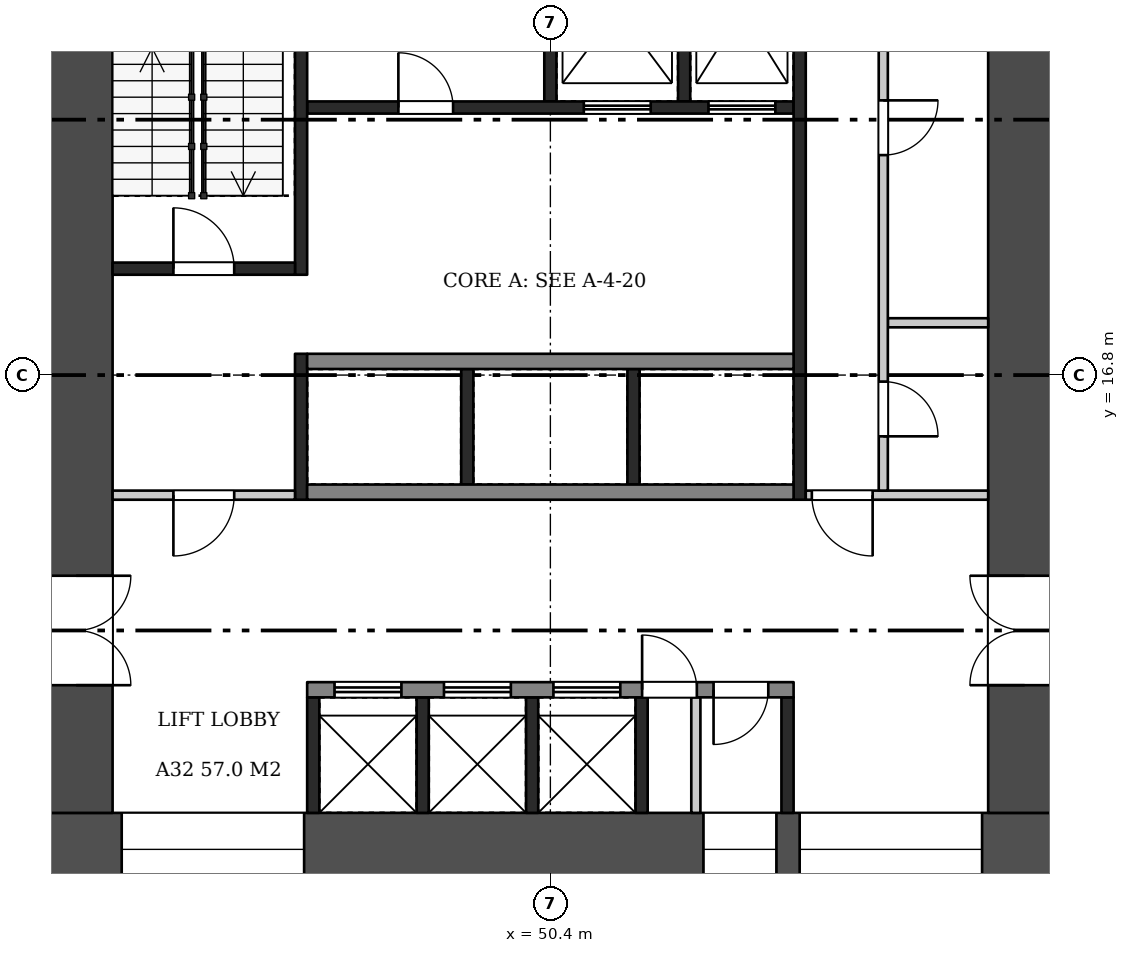
"""IFC4 building model, lengths in metres.
Left out: names, types, materials, properties, quantities, classifications, styles, units other than length and angle.
Written with IfcOpenShell. Run it as: python <this file> out.ifc"""

import sys

from ifc_helpers import new_model, si_unit, direction, frame, frame_2d, origin, place, context, subcontext, project, spatial, rectangle, extrude, element, fill, save


model = new_model("IFC4")
c1 = context("Model", 3, precision=1e-05, world=origin(), true_north=direction((0.0, 1.0)))
c2 = subcontext(c1, "Body", "Model", "MODEL_VIEW")
j1 = project(units=[si_unit("LENGTHUNIT", "METRE"), si_unit("PLANEANGLEUNIT", "RADIAN")], contexts=[c1])
p1 = place(None, origin())
s1 = spatial("IfcSite", under=j1, at=p1, CompositionType="ELEMENT")
p2 = place(p1, origin())
s2 = spatial("IfcBuilding", under=s1, at=p2, CompositionType="ELEMENT")
p3 = place(p2, frame((0.0, 0.0, 126.7)))
s3 = spatial("IfcBuildingStorey", under=s2, at=p3, CompositionType="ELEMENT", Elevation=126.7)
p4 = place(p3, frame((42.0, 9.0, 0.0), z_axis=(0.0, 0.0, 1.0), x_axis=(1.0, 0.0, 0.0)))
e1 = element("IfcWall", 1, at=p4, inside=s3, PredefinedType="SHEAR", context=c2, shape_type="SweptSolid", body=[
    extrude(rectangle(XDim=16.8, YDim=1.2, at=frame_2d((8.4, 0.0))), origin(), (0.0, 0.0, 1.0), 3.22),
])
p5 = place(p4, frame((1.35, 0.0, 0.6)))
e2 = element("IfcOpeningElement", 2, at=p5, cuts=e1, PredefinedType="OPENING", context=c2, shape_type="SweptSolid", body=[
    extrude(rectangle(XDim=3.0, YDim=2.1, at=frame_2d((1.5, 1.05))), frame((0.0, 0.61, 0.0), z_axis=(0.0, -1.0, 0.0), x_axis=(1.0, 0.0, 0.0)), (0.0, 0.0, 1.0), 1.22),
])
p6 = place(p4, frame((10.917, 0.0, 1.6)))
e3 = element("IfcOpeningElement", 3, at=p6, cuts=e1, PredefinedType="OPENING", context=c2, shape_type="SweptSolid", body=[
    extrude(rectangle(XDim=1.2, YDim=1.2, at=frame_2d((0.6, 0.6))), frame((0.0, 0.61, 0.0), z_axis=(0.0, -1.0, 0.0), x_axis=(1.0, 0.0, 0.0)), (0.0, 0.0, 1.0), 1.22),
])
p7 = place(p4, frame((12.5, 0.0, 0.6)))
e4 = element("IfcOpeningElement", 4, at=p7, cuts=e1, PredefinedType="OPENING", context=c2, shape_type="SweptSolid", body=[
    extrude(rectangle(XDim=3.0, YDim=2.1, at=frame_2d((1.5, 1.05))), frame((0.0, 0.61, 0.0), z_axis=(0.0, -1.0, 0.0), x_axis=(1.0, 0.0, 0.0)), (0.0, 0.0, 1.0), 1.22),
])
p8 = place(p3, frame((42.6, 9.6, 0.0), z_axis=(0.0, 0.0, 1.0), x_axis=(0.0, 1.0, 0.0)))
e5 = element("IfcWall", 5, at=p8, inside=s3, PredefinedType="SHEAR", context=c2, shape_type="SweptSolid", body=[
    extrude(rectangle(XDim=14.4, YDim=1.2, at=frame_2d((7.2, 0.0))), origin(), (0.0, 0.0, 1.0), 3.22),
])
p9 = place(p8, frame((2.1, 0.0, 0.0)))
e6 = element("IfcOpeningElement", 6, at=p9, cuts=e5, PredefinedType="OPENING", context=c2, shape_type="SweptSolid", body=[
    extrude(rectangle(XDim=1.8, YDim=2.1, at=frame_2d((0.9, 1.05))), frame((0.0, 0.61, 0.0), z_axis=(0.0, -1.0, 0.0), x_axis=(1.0, 0.0, 0.0)), (0.0, 0.0, 1.0), 1.22),
])
p10 = place(p3, frame((58.2, 9.6, 0.0), z_axis=(0.0, 0.0, 1.0), x_axis=(0.0, 1.0, 0.0)))
e7 = element("IfcWall", 7, at=p10, inside=s3, PredefinedType="SHEAR", context=c2, shape_type="SweptSolid", body=[
    extrude(rectangle(XDim=14.4, YDim=1.2, at=frame_2d((7.2, 0.0))), origin(), (0.0, 0.0, 1.0), 3.22),
])
p11 = place(p10, frame((2.1, 0.0, 0.0)))
e8 = element("IfcOpeningElement", 8, at=p11, cuts=e7, PredefinedType="OPENING", context=c2, shape_type="SweptSolid", body=[
    extrude(rectangle(XDim=1.8, YDim=2.1, at=frame_2d((0.9, 1.05))), frame((0.0, 0.61, 0.0), z_axis=(0.0, -1.0, 0.0), x_axis=(1.0, 0.0, 0.0)), (0.0, 0.0, 1.0), 1.22),
])
for number, where, z_axis, x_axis in (
    (9, (46.5, 9.6, 0.0), (0.0, 0.0, 1.0), (0.0, 1.0, 0.0)),
    (10, (48.3, 9.6, 0.0), (0.0, 0.0, 1.0), (0.0, 1.0, 0.0)),
    (11, (50.1, 9.6, 0.0), (0.0, 0.0, 1.0), (0.0, 1.0, 0.0)),
    (12, (51.9, 9.6, 0.0), (0.0, 0.0, 1.0), (0.0, 1.0, 0.0)),
    (13, (54.3, 9.6, 0.0), (0.0, 0.0, 1.0), (0.0, 1.0, 0.0)),
):
    element("IfcWall", number, at=place(p3, frame(where, z_axis=z_axis, x_axis=x_axis)), inside=s3, PredefinedType="SHEAR", context=c2, shape_type="SweptSolid", body=[
        extrude(rectangle(XDim=1.9, YDim=0.2, at=frame_2d((0.95, 0.0))), origin(), (0.0, 0.0, 1.0), 3.22),
    ])
p12 = place(p3, frame((52.792, 9.6, 0.0), z_axis=(0.0, 0.0, 1.0), x_axis=(0.0, 1.0, 0.0)))
e14 = element("IfcWall", 14, at=p12, inside=s3, PredefinedType="PARTITIONING", context=c2, shape_type="SweptSolid", body=[
    extrude(rectangle(XDim=1.9, YDim=0.15, at=frame_2d((0.95, 0.0))), origin(), (0.0, 0.0, 1.0), 3.22),
])
p13 = place(p3, frame((46.4, 11.625, 0.0), z_axis=(0.0, 0.0, 1.0), x_axis=(1.0, 0.0, 0.0)))
e15 = element("IfcWall", 15, at=p13, inside=s3, PredefinedType="SHEAR", context=c2, shape_type="SweptSolid", body=[
    extrude(rectangle(XDim=8.0, YDim=0.25, at=frame_2d((4.0, 0.0))), origin(), (0.0, 0.0, 1.0), 3.22),
])
p14 = place(p13, frame((0.45, 0.0, 0.0)))
e16 = element("IfcOpeningElement", 16, at=p14, cuts=e15, PredefinedType="OPENING", context=c2, shape_type="SweptSolid", body=[
    extrude(rectangle(XDim=1.1, YDim=2.1, at=frame_2d((0.55, 1.05))), frame((0.0, 0.135, 0.0), z_axis=(0.0, -1.0, 0.0), x_axis=(1.0, 0.0, 0.0)), (0.0, 0.0, 1.0), 0.27),
])
p15 = place(p13, frame((2.25, 0.0, 0.0)))
e17 = element("IfcOpeningElement", 17, at=p15, cuts=e15, PredefinedType="OPENING", context=c2, shape_type="SweptSolid", body=[
    extrude(rectangle(XDim=1.1, YDim=2.1, at=frame_2d((0.55, 1.05))), frame((0.0, 0.135, 0.0), z_axis=(0.0, -1.0, 0.0), x_axis=(1.0, 0.0, 0.0)), (0.0, 0.0, 1.0), 0.27),
])
p16 = place(p13, frame((4.05, 0.0, 0.0)))
e18 = element("IfcOpeningElement", 18, at=p16, cuts=e15, PredefinedType="OPENING", context=c2, shape_type="SweptSolid", body=[
    extrude(rectangle(XDim=1.1, YDim=2.1, at=frame_2d((0.55, 1.05))), frame((0.0, 0.135, 0.0), z_axis=(0.0, -1.0, 0.0), x_axis=(1.0, 0.0, 0.0)), (0.0, 0.0, 1.0), 0.27),
])
p17 = place(p13, frame((5.509, 0.0, 0.0)))
e19 = element("IfcOpeningElement", 19, at=p17, cuts=e15, PredefinedType="OPENING", context=c2, shape_type="SweptSolid", body=[
    extrude(rectangle(XDim=0.9, YDim=2.1, at=frame_2d((0.45, 1.05))), frame((0.0, 0.135, 0.0), z_axis=(0.0, -1.0, 0.0), x_axis=(1.0, 0.0, 0.0)), (0.0, 0.0, 1.0), 0.27),
])
p18 = place(p13, frame((6.684, 0.0, 0.0)))
e20 = element("IfcOpeningElement", 20, at=p18, cuts=e15, PredefinedType="OPENING", context=c2, shape_type="SweptSolid", body=[
    extrude(rectangle(XDim=0.9, YDim=2.1, at=frame_2d((0.45, 1.05))), frame((0.0, 0.135, 0.0), z_axis=(0.0, -1.0, 0.0), x_axis=(1.0, 0.0, 0.0)), (0.0, 0.0, 1.0), 0.27),
])
for number, where, z_axis, x_axis in (
    (21, (49.033, 15.0, 0.0), (0.0, 0.0, 1.0), (0.0, 1.0, 0.0)),
    (22, (51.767, 15.0, 0.0), (0.0, 0.0, 1.0), (0.0, 1.0, 0.0)),
):
    element("IfcWall", number, at=place(p3, frame(where, z_axis=z_axis, x_axis=x_axis)), inside=s3, PredefinedType="SHEAR", context=c2, shape_type="SweptSolid", body=[
        extrude(rectangle(XDim=1.9, YDim=0.2, at=frame_2d((0.95, 0.0))), origin(), (0.0, 0.0, 1.0), 3.22),
    ])
for number, where, z_axis, x_axis in (
    (23, (46.4, 14.875, 0.0), (0.0, 0.0, 1.0), (1.0, 0.0, 0.0)),
    (24, (46.4, 17.025, 0.0), (0.0, 0.0, 1.0), (1.0, 0.0, 0.0)),
):
    element("IfcWall", number, at=place(p3, frame(where, z_axis=z_axis, x_axis=x_axis)), inside=s3, PredefinedType="SHEAR", context=c2, shape_type="SweptSolid", body=[
        extrude(rectangle(XDim=8.0, YDim=0.25, at=frame_2d((4.0, 0.0))), origin(), (0.0, 0.0, 1.0), 3.22),
    ])
for number, where, z_axis, x_axis in (
    (25, (50.4, 21.3, 0.0), (0.0, 0.0, 1.0), (0.0, 1.0, 0.0)),
    (26, (52.6, 21.3, 0.0), (0.0, 0.0, 1.0), (0.0, 1.0, 0.0)),
):
    element("IfcWall", number, at=place(p3, frame(where, z_axis=z_axis, x_axis=x_axis)), inside=s3, PredefinedType="SHEAR", context=c2, shape_type="SweptSolid", body=[
        extrude(rectangle(XDim=2.7, YDim=0.2, at=frame_2d((1.35, 0.0))), origin(), (0.0, 0.0, 1.0), 3.22),
    ])
p19 = place(p3, frame((46.4, 21.2, 0.0), z_axis=(0.0, 0.0, 1.0), x_axis=(1.0, 0.0, 0.0)))
e27 = element("IfcWall", 27, at=p19, inside=s3, PredefinedType="SHEAR", context=c2, shape_type="SweptSolid", body=[
    extrude(rectangle(XDim=8.0, YDim=0.2, at=frame_2d((4.0, 0.0))), origin(), (0.0, 0.0, 1.0), 3.22),
])
p20 = place(p19, frame((1.5, 0.0, 0.0)))
e28 = element("IfcOpeningElement", 28, at=p20, cuts=e27, PredefinedType="OPENING", context=c2, shape_type="SweptSolid", body=[
    extrude(rectangle(XDim=0.9, YDim=2.1, at=frame_2d((0.45, 1.05))), frame((0.0, 0.11, 0.0), z_axis=(0.0, -1.0, 0.0), x_axis=(1.0, 0.0, 0.0)), (0.0, 0.0, 1.0), 0.22),
])
p21 = place(p19, frame((4.55, 0.0, 0.0)))
e29 = element("IfcOpeningElement", 29, at=p21, cuts=e27, PredefinedType="OPENING", context=c2, shape_type="SweptSolid", body=[
    extrude(rectangle(XDim=1.1, YDim=2.1, at=frame_2d((0.55, 1.05))), frame((0.0, 0.11, 0.0), z_axis=(0.0, -1.0, 0.0), x_axis=(1.0, 0.0, 0.0)), (0.0, 0.0, 1.0), 0.22),
])
p22 = place(p19, frame((6.6, 0.0, 0.0)))
e30 = element("IfcOpeningElement", 30, at=p22, cuts=e27, PredefinedType="OPENING", context=c2, shape_type="SweptSolid", body=[
    extrude(rectangle(XDim=1.1, YDim=2.1, at=frame_2d((0.55, 1.05))), frame((0.0, 0.11, 0.0), z_axis=(0.0, -1.0, 0.0), x_axis=(1.0, 0.0, 0.0)), (0.0, 0.0, 1.0), 0.22),
])
p23 = place(p3, frame((46.3, 14.75, 0.0), z_axis=(0.0, 0.0, 1.0), x_axis=(0.0, 1.0, 0.0)))
e31 = element("IfcWall", 31, at=p23, inside=s3, PredefinedType="SHEAR", context=c2, shape_type="SweptSolid", body=[
    extrude(rectangle(XDim=2.4, YDim=0.2, at=frame_2d((1.2, 0.0))), origin(), (0.0, 0.0, 1.0), 3.22),
])
p24 = place(p3, frame((46.3, 18.45, 0.0), z_axis=(0.0, 0.0, 1.0), x_axis=(0.0, 1.0, 0.0)))
e32 = element("IfcWall", 32, at=p24, inside=s3, PredefinedType="SHEAR", context=c2, shape_type="SweptSolid", body=[
    extrude(rectangle(XDim=5.55, YDim=0.2, at=frame_2d((2.775, 0.0))), origin(), (0.0, 0.0, 1.0), 3.22),
])
p25 = place(p3, frame((43.2, 14.825, 0.0), z_axis=(0.0, 0.0, 1.0), x_axis=(1.0, 0.0, 0.0)))
e33 = element("IfcWall", 33, at=p25, inside=s3, PredefinedType="PARTITIONING", context=c2, shape_type="SweptSolid", body=[
    extrude(rectangle(XDim=3.0, YDim=0.15, at=frame_2d((1.5, 0.0))), origin(), (0.0, 0.0, 1.0), 3.22),
])
p26 = place(p25, frame((1.0, 0.0, 0.0)))
e34 = element("IfcOpeningElement", 34, at=p26, cuts=e33, PredefinedType="OPENING", context=c2, shape_type="SweptSolid", body=[
    extrude(rectangle(XDim=1.0, YDim=2.1, at=frame_2d((0.5, 1.05))), frame((0.0, 0.085, 0.0), z_axis=(0.0, -1.0, 0.0), x_axis=(1.0, 0.0, 0.0)), (0.0, 0.0, 1.0), 0.17),
])
p27 = place(p3, frame((43.2, 18.55, 0.0), z_axis=(0.0, 0.0, 1.0), x_axis=(1.0, 0.0, 0.0)))
e35 = element("IfcWall", 35, at=p27, inside=s3, PredefinedType="SHEAR", context=c2, shape_type="SweptSolid", body=[
    extrude(rectangle(XDim=3.0, YDim=0.2, at=frame_2d((1.5, 0.0))), origin(), (0.0, 0.0, 1.0), 3.22),
])
p28 = place(p27, frame((1.0, 0.0, 0.0)))
e36 = element("IfcOpeningElement", 36, at=p28, cuts=e35, PredefinedType="OPENING", context=c2, shape_type="SweptSolid", body=[
    extrude(rectangle(XDim=1.0, YDim=2.1, at=frame_2d((0.5, 1.05))), frame((0.0, 0.11, 0.0), z_axis=(0.0, -1.0, 0.0), x_axis=(1.0, 0.0, 0.0)), (0.0, 0.0, 1.0), 0.22),
])
p29 = place(p3, frame((54.5, 14.75, 0.0), z_axis=(0.0, 0.0, 1.0), x_axis=(0.0, 1.0, 0.0)))
e37 = element("IfcWall", 37, at=p29, inside=s3, PredefinedType="SHEAR", context=c2, shape_type="SweptSolid", body=[
    extrude(rectangle(XDim=9.25, YDim=0.2, at=frame_2d((4.625, 0.0))), origin(), (0.0, 0.0, 1.0), 3.22),
])
p30 = place(p3, frame((54.6, 14.825, 0.0), z_axis=(0.0, 0.0, 1.0), x_axis=(1.0, 0.0, 0.0)))
e38 = element("IfcWall", 38, at=p30, inside=s3, PredefinedType="PARTITIONING", context=c2, shape_type="SweptSolid", body=[
    extrude(rectangle(XDim=3.0, YDim=0.15, at=frame_2d((1.5, 0.0))), origin(), (0.0, 0.0, 1.0), 3.22),
])
p31 = place(p30, frame((0.1, 0.0, 0.0)))
e39 = element("IfcOpeningElement", 39, at=p31, cuts=e38, PredefinedType="OPENING", context=c2, shape_type="SweptSolid", body=[
    extrude(rectangle(XDim=1.0, YDim=2.1, at=frame_2d((0.5, 1.05))), frame((0.0, 0.085, 0.0), z_axis=(0.0, -1.0, 0.0), x_axis=(1.0, 0.0, 0.0)), (0.0, 0.0, 1.0), 0.17),
])
p32 = place(p3, frame((55.95, 17.66, 0.0), z_axis=(0.0, 0.0, 1.0), x_axis=(1.0, 0.0, 0.0)))
e40 = element("IfcWall", 40, at=p32, inside=s3, PredefinedType="PARTITIONING", context=c2, shape_type="SweptSolid", body=[
    extrude(rectangle(XDim=1.65, YDim=0.15, at=frame_2d((0.825, 0.0))), origin(), (0.0, 0.0, 1.0), 3.22),
])
p33 = place(p3, frame((55.875, 14.9, 0.0), z_axis=(0.0, 0.0, 1.0), x_axis=(0.0, 1.0, 0.0)))
e41 = element("IfcWall", 41, at=p33, inside=s3, PredefinedType="PARTITIONING", context=c2, shape_type="SweptSolid", body=[
    extrude(rectangle(XDim=9.1, YDim=0.15, at=frame_2d((4.55, 0.0))), origin(), (0.0, 0.0, 1.0), 3.22),
])
p34 = place(p33, frame((0.893, 0.0, 0.0)))
e42 = element("IfcOpeningElement", 42, at=p34, cuts=e41, PredefinedType="OPENING", context=c2, shape_type="SweptSolid", body=[
    extrude(rectangle(XDim=0.9, YDim=2.1, at=frame_2d((0.45, 1.05))), frame((0.0, 0.085, 0.0), z_axis=(0.0, -1.0, 0.0), x_axis=(1.0, 0.0, 0.0)), (0.0, 0.0, 1.0), 0.17),
])
p35 = place(p33, frame((5.518, 0.0, 0.0)))
e43 = element("IfcOpeningElement", 43, at=p35, cuts=e41, PredefinedType="OPENING", context=c2, shape_type="SweptSolid", body=[
    extrude(rectangle(XDim=0.9, YDim=2.1, at=frame_2d((0.45, 1.05))), frame((0.0, 0.085, 0.0), z_axis=(0.0, -1.0, 0.0), x_axis=(1.0, 0.0, 0.0)), (0.0, 0.0, 1.0), 0.17),
])
p36 = place(p9, frame((1.8, 0.0, 0.0), z_axis=(0.0, 0.0, 1.0), x_axis=(-1.0, 0.0, 0.0)))
e44 = element("IfcDoor", 44, at=p36, inside=s3, OperationType="DOUBLE_DOOR_SINGLE_SWING", PredefinedType="DOOR", context=c2, shape_type="SweptSolid", body=[
    extrude(rectangle(XDim=1.8, YDim=2.1, at=frame_2d((0.9, 1.05))), frame((0.0, 0.025, 0.0), z_axis=(0.0, -1.0, 0.0), x_axis=(1.0, 0.0, 0.0)), (0.0, 0.0, 1.0), 0.05),
])
fill(e6, e44)
p37 = place(p11, origin())
e45 = element("IfcDoor", 45, at=p37, inside=s3, OperationType="DOUBLE_DOOR_SINGLE_SWING", PredefinedType="DOOR", context=c2, shape_type="SweptSolid", body=[
    extrude(rectangle(XDim=1.8, YDim=2.1, at=frame_2d((0.9, 1.05))), frame((0.0, 0.025, 0.0), z_axis=(0.0, -1.0, 0.0), x_axis=(1.0, 0.0, 0.0)), (0.0, 0.0, 1.0), 0.05),
])
fill(e8, e45)
p38 = place(p14, origin())
e46 = element("IfcDoor", 46, at=p38, inside=s3, OperationType="DOUBLE_DOOR_SLIDING", PredefinedType="DOOR", context=c2, shape_type="SweptSolid", body=[
    extrude(rectangle(XDim=1.1, YDim=2.1, at=frame_2d((0.55, 1.05))), frame((0.0, 0.025, 0.0), z_axis=(0.0, -1.0, 0.0), x_axis=(1.0, 0.0, 0.0)), (0.0, 0.0, 1.0), 0.05),
])
fill(e16, e46)
p39 = place(p15, origin())
e47 = element("IfcDoor", 47, at=p39, inside=s3, OperationType="DOUBLE_DOOR_SLIDING", PredefinedType="DOOR", context=c2, shape_type="SweptSolid", body=[
    extrude(rectangle(XDim=1.1, YDim=2.1, at=frame_2d((0.55, 1.05))), frame((0.0, 0.025, 0.0), z_axis=(0.0, -1.0, 0.0), x_axis=(1.0, 0.0, 0.0)), (0.0, 0.0, 1.0), 0.05),
])
fill(e17, e47)
p40 = place(p16, origin())
e48 = element("IfcDoor", 48, at=p40, inside=s3, OperationType="DOUBLE_DOOR_SLIDING", PredefinedType="DOOR", context=c2, shape_type="SweptSolid", body=[
    extrude(rectangle(XDim=1.1, YDim=2.1, at=frame_2d((0.55, 1.05))), frame((0.0, 0.025, 0.0), z_axis=(0.0, -1.0, 0.0), x_axis=(1.0, 0.0, 0.0)), (0.0, 0.0, 1.0), 0.05),
])
fill(e18, e48)
p41 = place(p17, origin())
e49 = element("IfcDoor", 49, at=p41, inside=s3, OperationType="SINGLE_SWING_LEFT", PredefinedType="DOOR", context=c2, shape_type="SweptSolid", body=[
    extrude(rectangle(XDim=0.9, YDim=2.1, at=frame_2d((0.45, 1.05))), frame((0.0, 0.025, 0.0), z_axis=(0.0, -1.0, 0.0), x_axis=(1.0, 0.0, 0.0)), (0.0, 0.0, 1.0), 0.05),
])
fill(e19, e49)
p42 = place(p18, frame((0.9, 0.0, 0.0), z_axis=(0.0, 0.0, 1.0), x_axis=(-1.0, 0.0, 0.0)))
e50 = element("IfcDoor", 50, at=p42, inside=s3, OperationType="SINGLE_SWING_RIGHT", PredefinedType="DOOR", context=c2, shape_type="SweptSolid", body=[
    extrude(rectangle(XDim=0.9, YDim=2.1, at=frame_2d((0.45, 1.05))), frame((0.0, 0.025, 0.0), z_axis=(0.0, -1.0, 0.0), x_axis=(1.0, 0.0, 0.0)), (0.0, 0.0, 1.0), 0.05),
])
fill(e20, e50)
p43 = place(p20, origin())
e51 = element("IfcDoor", 51, at=p43, inside=s3, OperationType="SINGLE_SWING_LEFT", PredefinedType="DOOR", context=c2, shape_type="SweptSolid", body=[
    extrude(rectangle(XDim=0.9, YDim=2.1, at=frame_2d((0.45, 1.05))), frame((0.0, 0.025, 0.0), z_axis=(0.0, -1.0, 0.0), x_axis=(1.0, 0.0, 0.0)), (0.0, 0.0, 1.0), 0.05),
])
fill(e28, e51)
p44 = place(p21, origin())
e52 = element("IfcDoor", 52, at=p44, inside=s3, OperationType="DOUBLE_DOOR_SLIDING", PredefinedType="DOOR", context=c2, shape_type="SweptSolid", body=[
    extrude(rectangle(XDim=1.1, YDim=2.1, at=frame_2d((0.55, 1.05))), frame((0.0, 0.025, 0.0), z_axis=(0.0, -1.0, 0.0), x_axis=(1.0, 0.0, 0.0)), (0.0, 0.0, 1.0), 0.05),
])
fill(e29, e52)
p45 = place(p22, origin())
e53 = element("IfcDoor", 53, at=p45, inside=s3, OperationType="DOUBLE_DOOR_SLIDING", PredefinedType="DOOR", context=c2, shape_type="SweptSolid", body=[
    extrude(rectangle(XDim=1.1, YDim=2.1, at=frame_2d((0.55, 1.05))), frame((0.0, 0.025, 0.0), z_axis=(0.0, -1.0, 0.0), x_axis=(1.0, 0.0, 0.0)), (0.0, 0.0, 1.0), 0.05),
])
fill(e30, e53)
p46 = place(p26, frame((1.0, 0.0, 0.0), z_axis=(0.0, 0.0, 1.0), x_axis=(-1.0, 0.0, 0.0)))
e54 = element("IfcDoor", 54, at=p46, inside=s3, OperationType="SINGLE_SWING_RIGHT", PredefinedType="DOOR", context=c2, shape_type="SweptSolid", body=[
    extrude(rectangle(XDim=1.0, YDim=2.1, at=frame_2d((0.5, 1.05))), frame((0.0, 0.025, 0.0), z_axis=(0.0, -1.0, 0.0), x_axis=(1.0, 0.0, 0.0)), (0.0, 0.0, 1.0), 0.05),
])
fill(e34, e54)
p47 = place(p28, origin())
e55 = element("IfcDoor", 55, at=p47, inside=s3, OperationType="SINGLE_SWING_LEFT", PredefinedType="DOOR", context=c2, shape_type="SweptSolid", body=[
    extrude(rectangle(XDim=1.0, YDim=2.1, at=frame_2d((0.5, 1.05))), frame((0.0, 0.025, 0.0), z_axis=(0.0, -1.0, 0.0), x_axis=(1.0, 0.0, 0.0)), (0.0, 0.0, 1.0), 0.05),
])
fill(e36, e55)
p48 = place(p31, frame((1.0, 0.0, 0.0), z_axis=(0.0, 0.0, 1.0), x_axis=(-1.0, 0.0, 0.0)))
e56 = element("IfcDoor", 56, at=p48, inside=s3, OperationType="SINGLE_SWING_LEFT", PredefinedType="DOOR", context=c2, shape_type="SweptSolid", body=[
    extrude(rectangle(XDim=1.0, YDim=2.1, at=frame_2d((0.5, 1.05))), frame((0.0, 0.025, 0.0), z_axis=(0.0, -1.0, 0.0), x_axis=(1.0, 0.0, 0.0)), (0.0, 0.0, 1.0), 0.05),
])
fill(e39, e56)
p49 = place(p34, frame((0.9, 0.0, 0.0), z_axis=(0.0, 0.0, 1.0), x_axis=(-1.0, 0.0, 0.0)))
e57 = element("IfcDoor", 57, at=p49, inside=s3, OperationType="SINGLE_SWING_RIGHT", PredefinedType="DOOR", context=c2, shape_type="SweptSolid", body=[
    extrude(rectangle(XDim=0.9, YDim=2.1, at=frame_2d((0.45, 1.05))), frame((0.0, 0.025, 0.0), z_axis=(0.0, -1.0, 0.0), x_axis=(1.0, 0.0, 0.0)), (0.0, 0.0, 1.0), 0.05),
])
fill(e42, e57)
p50 = place(p35, frame((0.9, 0.0, 0.0), z_axis=(0.0, 0.0, 1.0), x_axis=(-1.0, 0.0, 0.0)))
e58 = element("IfcDoor", 58, at=p50, inside=s3, OperationType="SINGLE_SWING_LEFT", PredefinedType="DOOR", context=c2, shape_type="SweptSolid", body=[
    extrude(rectangle(XDim=0.9, YDim=2.1, at=frame_2d((0.45, 1.05))), frame((0.0, 0.025, 0.0), z_axis=(0.0, -1.0, 0.0), x_axis=(1.0, 0.0, 0.0)), (0.0, 0.0, 1.0), 0.05),
])
fill(e43, e58)
p51 = place(p5, origin())
e59 = element("IfcWindow", 59, at=p51, inside=s3, PartitioningType="SINGLE_PANEL", PredefinedType="WINDOW", context=c2, shape_type="SweptSolid", body=[
    extrude(rectangle(XDim=3.0, YDim=2.1, at=frame_2d((1.5, 1.05))), frame((0.0, 0.03, 0.0), z_axis=(0.0, -1.0, 0.0), x_axis=(1.0, 0.0, 0.0)), (0.0, 0.0, 1.0), 0.06),
])
fill(e2, e59)
p52 = place(p6, origin())
e60 = element("IfcWindow", 60, at=p52, inside=s3, PartitioningType="SINGLE_PANEL", PredefinedType="WINDOW", context=c2, shape_type="SweptSolid", body=[
    extrude(rectangle(XDim=1.2, YDim=1.2, at=frame_2d((0.6, 0.6))), frame((0.0, 0.03, 0.0), z_axis=(0.0, -1.0, 0.0), x_axis=(1.0, 0.0, 0.0)), (0.0, 0.0, 1.0), 0.06),
])
fill(e3, e60)
p53 = place(p7, origin())
e61 = element("IfcWindow", 61, at=p53, inside=s3, PartitioningType="SINGLE_PANEL", PredefinedType="WINDOW", context=c2, shape_type="SweptSolid", body=[
    extrude(rectangle(XDim=3.0, YDim=2.1, at=frame_2d((1.5, 1.05))), frame((0.0, 0.03, 0.0), z_axis=(0.0, -1.0, 0.0), x_axis=(1.0, 0.0, 0.0)), (0.0, 0.0, 1.0), 0.06),
])
fill(e4, e61)
save(model, sys.argv[1])
